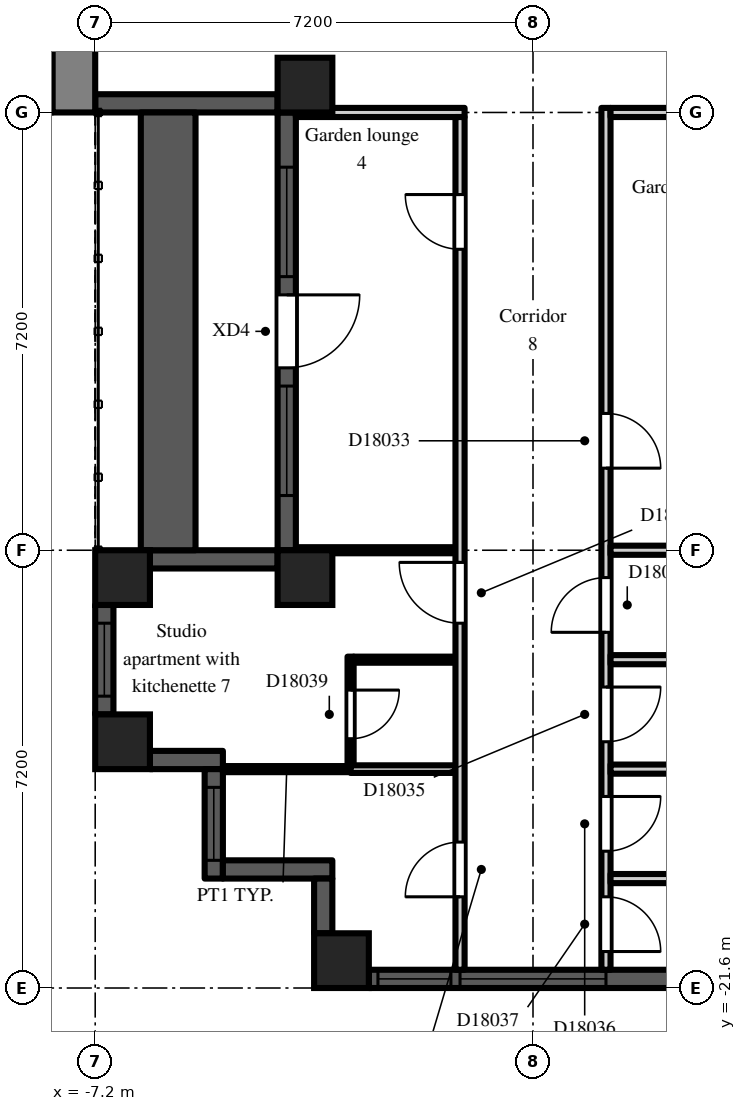
"""IFC4 building model, lengths in metres.
Left out: names, types, materials, properties, quantities, classifications, styles, units other than length and angle.
Written with IfcOpenShell. Run it as: python <this file> out.ifc"""

import sys

from ifc_helpers import new_model, si_unit, direction, frame, frame_2d, origin, origin_2d, place, context, subcontext, project, spatial, rectangle, extrude, element, fill, save


model = new_model("IFC4")
c1 = context("Model", 3, precision=1e-05, world=origin(), true_north=direction((0.0, 1.0)))
c2 = subcontext(c1, "Body", "Model", "MODEL_VIEW")
j1 = project(units=[si_unit("LENGTHUNIT", "METRE"), si_unit("PLANEANGLEUNIT", "RADIAN")], contexts=[c1])
p1 = place(None, origin())
s1 = spatial("IfcSite", under=j1, at=p1, CompositionType="ELEMENT")
p2 = place(p1, origin())
s2 = spatial("IfcBuilding", under=s1, at=p2, CompositionType="ELEMENT")
p3 = place(p2, frame((0.0, 0.0, 120.3)))
s3 = spatial("IfcBuildingStorey", under=s2, at=p3, CompositionType="ELEMENT", Elevation=120.3)
for number, where, z_axis, x_axis in (
    (1, (-6.75, -17.55, 0.0), (0.0, 0.0, 1.0), (1.0, 0.0, 0.0)),
    (2, (-6.75, -14.85, 0.0), (0.0, 0.0, 1.0), (1.0, 0.0, 0.0)),
    (3, (-3.75, -14.85, 0.0), (0.0, 0.0, 1.0), (1.0, 0.0, 0.0)),
    (4, (-3.75, -6.75, 0.0), (0.0, 0.0, 1.0), (1.0, 0.0, 0.0)),
    (5, (-3.15, -21.15, 0.0), (0.0, 0.0, 1.0), (1.0, 0.0, 0.0)),
):
    element("IfcColumn", number, at=place(p3, frame(where, z_axis=z_axis, x_axis=x_axis)), inside=s3, PredefinedType="COLUMN", context=c2, shape_type="SweptSolid", body=[
        extrude(rectangle(XDim=0.9, YDim=0.9, at=origin_2d()), origin(), (0.0, 0.0, 1.0), 3.0),
    ])
p4 = place(p3, frame((-7.2, -7.05, 0.0), z_axis=(0.0, 0.0, 1.0), x_axis=(1.0, 0.0, 0.0)))
e6 = element("IfcWall", 6, at=p4, inside=s3, PredefinedType="SOLIDWALL", context=c2, shape_type="SweptSolid", body=[
    extrude(rectangle(XDim=3.0, YDim=0.3, at=frame_2d((1.5, 0.0))), origin(), (0.0, 0.0, 1.0), 2.2),
])
p5 = place(p3, frame((-4.05, -7.2, 0.0), z_axis=(0.0, 0.0, 1.0), x_axis=(0.0, -1.0, 0.0)))
e7 = element("IfcWall", 7, at=p5, inside=s3, PredefinedType="SOLIDWALL", context=c2, shape_type="SweptSolid", body=[
    extrude(rectangle(XDim=7.2, YDim=0.3, at=frame_2d((3.6, 0.0))), origin(), (0.0, 0.0, 1.0), 2.2),
])
p6 = place(p5, frame((3.0, 0.0, 0.0)))
e8 = element("IfcOpeningElement", 8, at=p6, cuts=e7, PredefinedType="OPENING", context=c2, shape_type="SweptSolid", body=[
    extrude(rectangle(XDim=1.2, YDim=2.05, at=frame_2d((0.6, 1.025))), frame((0.0, 0.16, 0.0), z_axis=(0.0, -1.0, 0.0), x_axis=(1.0, 0.0, 0.0)), (0.0, 0.0, 1.0), 0.32),
])
p7 = place(p5, frame((0.9, 0.0, 0.2)))
e9 = element("IfcOpeningElement", 9, at=p7, cuts=e7, PredefinedType="OPENING", context=c2, shape_type="SweptSolid", body=[
    extrude(rectangle(XDim=1.8, YDim=1.85, at=frame_2d((0.9, 0.925))), frame((0.0, 0.16, 0.0), z_axis=(0.0, -1.0, 0.0), x_axis=(1.0, 0.0, 0.0)), (0.0, 0.0, 1.0), 0.32),
])
p8 = place(p5, frame((4.5, 0.0, 0.2)))
e10 = element("IfcOpeningElement", 10, at=p8, cuts=e7, PredefinedType="OPENING", context=c2, shape_type="SweptSolid", body=[
    extrude(rectangle(XDim=1.8, YDim=1.85, at=frame_2d((0.9, 0.925))), frame((0.0, 0.16, 0.0), z_axis=(0.0, -1.0, 0.0), x_axis=(1.0, 0.0, 0.0)), (0.0, 0.0, 1.0), 0.32),
])
p9 = place(p3, frame((-4.2, -14.55, 0.0), z_axis=(0.0, 0.0, 1.0), x_axis=(-1.0, 0.0, 0.0)))
e11 = element("IfcWall", 11, at=p9, inside=s3, PredefinedType="SOLIDWALL", context=c2, shape_type="SweptSolid", body=[
    extrude(rectangle(XDim=2.1, YDim=0.3, at=frame_2d((1.05, 0.0))), origin(), (0.0, 0.0, 1.0), 2.2),
])
p10 = place(p3, frame((-7.05, -15.3, 0.0), z_axis=(0.0, 0.0, 1.0), x_axis=(0.0, -1.0, 0.0)))
e12 = element("IfcWall", 12, at=p10, inside=s3, PredefinedType="SOLIDWALL", context=c2, shape_type="SweptSolid", body=[
    extrude(rectangle(XDim=1.8, YDim=0.3, at=frame_2d((0.9, 0.0))), origin(), (0.0, 0.0, 1.0), 2.2),
])
p11 = place(p10, frame((0.3, 0.0, 0.2)))
e13 = element("IfcOpeningElement", 13, at=p11, cuts=e12, PredefinedType="OPENING", context=c2, shape_type="SweptSolid", body=[
    extrude(rectangle(XDim=1.2, YDim=1.85, at=frame_2d((0.6, 0.925))), frame((0.0, 0.16, 0.0), z_axis=(0.0, -1.0, 0.0), x_axis=(1.0, 0.0, 0.0)), (0.0, 0.0, 1.0), 0.32),
])
p12 = place(p3, frame((-6.3, -17.85, 0.0), z_axis=(0.0, 0.0, 1.0), x_axis=(1.0, 0.0, 0.0)))
e14 = element("IfcWall", 14, at=p12, inside=s3, PredefinedType="SOLIDWALL", context=c2, shape_type="SweptSolid", body=[
    extrude(rectangle(XDim=1.2, YDim=0.3, at=frame_2d((0.6, 0.0))), origin(), (0.0, 0.0, 1.0), 2.6),
])
p13 = place(p3, frame((-5.25, -18.0, 0.0), z_axis=(0.0, 0.0, 1.0), x_axis=(0.0, -1.0, 0.0)))
e15 = element("IfcWall", 15, at=p13, inside=s3, PredefinedType="SOLIDWALL", context=c2, shape_type="SweptSolid", body=[
    extrude(rectangle(XDim=1.8, YDim=0.3, at=frame_2d((0.9, 0.0))), origin(), (0.0, 0.0, 1.0), 2.6),
])
p14 = place(p13, frame((0.3, 0.0, 0.2)))
e16 = element("IfcOpeningElement", 16, at=p14, cuts=e15, PredefinedType="OPENING", context=c2, shape_type="SweptSolid", body=[
    extrude(rectangle(XDim=1.2, YDim=1.85, at=frame_2d((0.6, 0.925))), frame((0.0, 0.16, 0.0), z_axis=(0.0, -1.0, 0.0), x_axis=(1.0, 0.0, 0.0)), (0.0, 0.0, 1.0), 0.32),
])
p15 = place(p3, frame((-5.1, -19.65, 0.0), z_axis=(0.0, 0.0, 1.0), x_axis=(1.0, 0.0, 0.0)))
e17 = element("IfcWall", 17, at=p15, inside=s3, PredefinedType="SOLIDWALL", context=c2, shape_type="SweptSolid", body=[
    extrude(rectangle(XDim=1.8, YDim=0.3, at=frame_2d((0.9, 0.0))), origin(), (0.0, 0.0, 1.0), 2.6),
])
p16 = place(p3, frame((-3.45, -19.8, 0.0), z_axis=(0.0, 0.0, 1.0), x_axis=(0.0, -1.0, 0.0)))
e18 = element("IfcWall", 18, at=p16, inside=s3, PredefinedType="SOLIDWALL", context=c2, shape_type="SweptSolid", body=[
    extrude(rectangle(XDim=0.9, YDim=0.3, at=frame_2d((0.45, 0.0))), origin(), (0.0, 0.0, 1.0), 2.6),
])
p17 = place(p3, frame((-2.7, -21.45, 0.0), z_axis=(0.0, 0.0, 1.0), x_axis=(1.0, 0.0, 0.0)))
e19 = element("IfcWall", 19, at=p17, inside=s3, PredefinedType="SOLIDWALL", context=c2, shape_type="SweptSolid", body=[
    extrude(rectangle(XDim=5.4, YDim=0.3, at=frame_2d((2.7, 0.0))), origin(), (0.0, 0.0, 1.0), 2.2),
])
p18 = place(p17, frame((1.5, 0.0, 0.2)))
e20 = element("IfcOpeningElement", 20, at=p18, cuts=e19, PredefinedType="OPENING", context=c2, shape_type="SweptSolid", body=[
    extrude(rectangle(XDim=2.4, YDim=1.85, at=frame_2d((1.2, 0.925))), frame((0.0, 0.16, 0.0), z_axis=(0.0, -1.0, 0.0), x_axis=(1.0, 0.0, 0.0)), (0.0, 0.0, 1.0), 0.32),
])
p19 = place(p17, frame((0.15, 0.0, 0.2)))
e21 = element("IfcOpeningElement", 21, at=p19, cuts=e19, PredefinedType="OPENING", context=c2, shape_type="SweptSolid", body=[
    extrude(rectangle(XDim=1.2, YDim=1.85, at=frame_2d((0.6, 0.925))), frame((0.0, 0.16, 0.0), z_axis=(0.0, -1.0, 0.0), x_axis=(1.0, 0.0, 0.0)), (0.0, 0.0, 1.0), 0.32),
])
p20 = place(p3, frame((-6.0, -14.4, 0.0), z_axis=(0.0, 0.0, 1.0), x_axis=(0.0, 1.0, 0.0)))
e22 = element("IfcWall", 22, at=p20, inside=s3, PredefinedType="PARAPET", context=c2, shape_type="SweptSolid", body=[
    extrude(rectangle(XDim=7.2, YDim=0.9, at=frame_2d((3.6, 0.0))), origin(), (0.0, 0.0, 1.0), 0.8),
])
p21 = place(p3, frame((-7.55, -7.2, 0.0), z_axis=(0.0, 0.0, 1.0), x_axis=(0.0, 1.0, 0.0)))
e23 = element("IfcWall", 23, at=p21, inside=s3, PredefinedType="SHEAR", context=c2, shape_type="SweptSolid", body=[
    extrude(rectangle(XDim=14.4, YDim=0.7, at=frame_2d((7.2, 0.0))), origin(), (0.0, 0.0, 1.0), 2.6),
])
p22 = place(p21, frame((6.0, 0.0, 0.0)))
e24 = element("IfcOpeningElement", 24, at=p22, cuts=e23, PredefinedType="OPENING", context=c2, shape_type="SweptSolid", body=[
    extrude(rectangle(XDim=2.4, YDim=2.2, at=frame_2d((1.2, 1.1))), frame((0.0, 0.36, 0.0), z_axis=(0.0, -1.0, 0.0), x_axis=(1.0, 0.0, 0.0)), (0.0, 0.0, 1.0), 0.72),
])
p23 = place(p3, frame((-5.1, -18.0, 0.0), z_axis=(0.0, 0.0, 1.0), x_axis=(1.0, 0.0, 0.0)))
e25 = element("IfcWall", 25, at=p23, inside=s3, PredefinedType="PARTITIONING", context=c2, shape_type="SweptSolid", body=[
    extrude(rectangle(XDim=2.1, YDim=0.1, at=frame_2d((1.05, 0.0))), origin(), (0.0, 0.0, 1.0), 2.6),
])
p24 = place(p3, frame((-3.9, -14.4, 0.0), z_axis=(0.0, 0.0, 1.0), x_axis=(1.0, 0.0, 0.0)))
e26 = element("IfcWall", 26, at=p24, inside=s3, PredefinedType="PARTITIONING", context=c2, shape_type="SweptSolid", body=[
    extrude(rectangle(XDim=2.625, YDim=0.1, at=frame_2d((1.312, 0.0))), origin(), (0.0, 0.0, 1.0), 2.6),
])
p25 = place(p3, frame((-3.9, -7.2, 0.0), z_axis=(0.0, 0.0, 1.0), x_axis=(1.0, 0.0, 0.0)))
e27 = element("IfcWall", 27, at=p25, inside=s3, PredefinedType="PARTITIONING", context=c2, shape_type="SweptSolid", body=[
    extrude(rectangle(XDim=2.775, YDim=0.15, at=frame_2d((1.387, 0.0))), origin(), (0.0, 0.0, 1.0), 2.6),
])
p26 = place(p3, frame((-3.0, -17.938, 0.0), z_axis=(0.0, 0.0, 1.0), x_axis=(0.0, 1.0, 0.0)))
e28 = element("IfcWall", 28, at=p26, inside=s3, PredefinedType="PARTITIONING", context=c2, shape_type="SweptSolid", body=[
    extrude(rectangle(XDim=1.788, YDim=0.1, at=frame_2d((0.894, 0.0))), origin(), (0.0, 0.0, 1.0), 2.6),
])
p27 = place(p26, frame((0.438, 0.0, 0.0)))
e29 = element("IfcOpeningElement", 29, at=p27, cuts=e28, PredefinedType="OPENING", context=c2, shape_type="SweptSolid", body=[
    extrude(rectangle(XDim=0.8, YDim=2.1, at=frame_2d((0.4, 1.05))), frame((0.0, 0.06, 0.0), z_axis=(0.0, -1.0, 0.0), x_axis=(1.0, 0.0, 0.0)), (0.0, 0.0, 1.0), 0.12),
])
p28 = place(p3, frame((-3.0, -18.0, 0.0), z_axis=(0.0, 0.0, 1.0), x_axis=(1.0, 0.0, 0.0)))
e30 = element("IfcWall", 30, at=p28, inside=s3, PredefinedType="PARTITIONING", context=c2, shape_type="SweptSolid", body=[
    extrude(rectangle(XDim=1.725, YDim=0.125, at=frame_2d((0.863, 0.0))), origin(), (0.0, 0.0, 1.0), 2.6),
])
p29 = place(p3, frame((-2.95, -16.2, 0.0), z_axis=(0.0, 0.0, 1.0), x_axis=(1.0, 0.0, 0.0)))
e31 = element("IfcWall", 31, at=p29, inside=s3, PredefinedType="PARTITIONING", context=c2, shape_type="SweptSolid", body=[
    extrude(rectangle(XDim=1.675, YDim=0.1, at=frame_2d((0.837, 0.0))), origin(), (0.0, 0.0, 1.0), 2.6),
])
p30 = place(p3, frame((-1.2, -21.3, 0.0), z_axis=(0.0, 0.0, 1.0), x_axis=(0.0, 1.0, 0.0)))
e32 = element("IfcWall", 32, at=p30, inside=s3, PredefinedType="PARTITIONING", context=c2, shape_type="SweptSolid", body=[
    extrude(rectangle(XDim=14.025, YDim=0.15, at=frame_2d((7.013, 0.0))), origin(), (0.0, 0.0, 1.0), 2.6),
])
p31 = place(p30, frame((11.85, 0.0, 0.0)))
e33 = element("IfcOpeningElement", 33, at=p31, cuts=e32, PredefinedType="OPENING", context=c2, shape_type="SweptSolid", body=[
    extrude(rectangle(XDim=0.9, YDim=2.1, at=frame_2d((0.45, 1.05))), frame((0.0, 0.085, 0.0), z_axis=(0.0, -1.0, 0.0), x_axis=(1.0, 0.0, 0.0)), (0.0, 0.0, 1.0), 0.17),
])
p32 = place(p30, frame((5.7, 0.0, 0.0)))
e34 = element("IfcOpeningElement", 34, at=p32, cuts=e32, PredefinedType="OPENING", context=c2, shape_type="SweptSolid", body=[
    extrude(rectangle(XDim=1.0, YDim=2.1, at=frame_2d((0.5, 1.05))), frame((0.0, 0.085, 0.0), z_axis=(0.0, -1.0, 0.0), x_axis=(1.0, 0.0, 0.0)), (0.0, 0.0, 1.0), 0.17),
])
p33 = place(p30, frame((1.2, 0.0, 0.0)))
e35 = element("IfcOpeningElement", 35, at=p33, cuts=e32, PredefinedType="OPENING", context=c2, shape_type="SweptSolid", body=[
    extrude(rectangle(XDim=0.9, YDim=2.1, at=frame_2d((0.45, 1.05))), frame((0.0, 0.085, 0.0), z_axis=(0.0, -1.0, 0.0), x_axis=(1.0, 0.0, 0.0)), (0.0, 0.0, 1.0), 0.17),
])
p34 = place(p3, frame((1.2, -21.3, 0.0), z_axis=(0.0, 0.0, 1.0), x_axis=(0.0, 1.0, 0.0)))
e36 = element("IfcWall", 36, at=p34, inside=s3, PredefinedType="PARTITIONING", context=c2, shape_type="SweptSolid", body=[
    extrude(rectangle(XDim=14.175, YDim=0.15, at=frame_2d((7.087, 0.0))), origin(), (0.0, 0.0, 1.0), 2.6),
])
p35 = place(p34, frame((8.25, 0.0, 0.0)))
e37 = element("IfcOpeningElement", 37, at=p35, cuts=e36, PredefinedType="OPENING", context=c2, shape_type="SweptSolid", body=[
    extrude(rectangle(XDim=0.9, YDim=2.1, at=frame_2d((0.45, 1.05))), frame((0.0, 0.085, 0.0), z_axis=(0.0, -1.0, 0.0), x_axis=(1.0, 0.0, 0.0)), (0.0, 0.0, 1.0), 0.17),
])
p36 = place(p34, frame((5.55, 0.0, 0.0)))
e38 = element("IfcOpeningElement", 38, at=p36, cuts=e36, PredefinedType="OPENING", context=c2, shape_type="SweptSolid", body=[
    extrude(rectangle(XDim=0.9, YDim=2.1, at=frame_2d((0.45, 1.05))), frame((0.0, 0.085, 0.0), z_axis=(0.0, -1.0, 0.0), x_axis=(1.0, 0.0, 0.0)), (0.0, 0.0, 1.0), 0.17),
])
p37 = place(p34, frame((3.75, 0.0, 0.0)))
e39 = element("IfcOpeningElement", 39, at=p37, cuts=e36, PredefinedType="OPENING", context=c2, shape_type="SweptSolid", body=[
    extrude(rectangle(XDim=0.9, YDim=2.1, at=frame_2d((0.45, 1.05))), frame((0.0, 0.085, 0.0), z_axis=(0.0, -1.0, 0.0), x_axis=(1.0, 0.0, 0.0)), (0.0, 0.0, 1.0), 0.17),
])
p38 = place(p34, frame((1.95, 0.0, 0.0)))
e40 = element("IfcOpeningElement", 40, at=p38, cuts=e36, PredefinedType="OPENING", context=c2, shape_type="SweptSolid", body=[
    extrude(rectangle(XDim=0.9, YDim=2.1, at=frame_2d((0.45, 1.05))), frame((0.0, 0.085, 0.0), z_axis=(0.0, -1.0, 0.0), x_axis=(1.0, 0.0, 0.0)), (0.0, 0.0, 1.0), 0.17),
])
p39 = place(p34, frame((0.3, 0.0, 0.0)))
e41 = element("IfcOpeningElement", 41, at=p39, cuts=e36, PredefinedType="OPENING", context=c2, shape_type="SweptSolid", body=[
    extrude(rectangle(XDim=0.9, YDim=2.1, at=frame_2d((0.45, 1.05))), frame((0.0, 0.085, 0.0), z_axis=(0.0, -1.0, 0.0), x_axis=(1.0, 0.0, 0.0)), (0.0, 0.0, 1.0), 0.17),
])
p40 = place(p3, frame((1.275, -19.8, 0.0), z_axis=(0.0, 0.0, 1.0), x_axis=(1.0, 0.0, 0.0)))
e42 = element("IfcWall", 42, at=p40, inside=s3, PredefinedType="PARTITIONING", context=c2, shape_type="SweptSolid", body=[
    extrude(rectangle(XDim=2.025, YDim=0.15, at=frame_2d((1.013, 0.0))), origin(), (0.0, 0.0, 1.0), 2.6),
])
p41 = place(p3, frame((1.275, -18.0, 0.0), z_axis=(0.0, 0.0, 1.0), x_axis=(1.0, 0.0, 0.0)))
e43 = element("IfcWall", 43, at=p41, inside=s3, PredefinedType="PARTITIONING", context=c2, shape_type="SweptSolid", body=[
    extrude(rectangle(XDim=3.825, YDim=0.15, at=frame_2d((1.913, 0.0))), origin(), (0.0, 0.0, 1.0), 2.6),
])
p42 = place(p3, frame((1.275, -16.2, 0.0), z_axis=(0.0, 0.0, 1.0), x_axis=(1.0, 0.0, 0.0)))
e44 = element("IfcWall", 44, at=p42, inside=s3, PredefinedType="PARTITIONING", context=c2, shape_type="SweptSolid", body=[
    extrude(rectangle(XDim=5.625, YDim=0.15, at=frame_2d((2.812, 0.0))), origin(), (0.0, 0.0, 1.0), 2.6),
])
for number, where, z_axis, x_axis in (
    (45, (1.275, -14.4, 0.0), (0.0, 0.0, 1.0), (1.0, 0.0, 0.0)),
    (46, (1.275, -7.2, 0.0), (0.0, 0.0, 1.0), (1.0, 0.0, 0.0)),
):
    element("IfcWall", number, at=place(p3, frame(where, z_axis=z_axis, x_axis=x_axis)), inside=s3, PredefinedType="PARTITIONING", context=c2, shape_type="SweptSolid", body=[
        extrude(rectangle(XDim=2.625, YDim=0.15, at=frame_2d((1.312, 0.0))), origin(), (0.0, 0.0, 1.0), 2.6),
    ])
p43 = place(p6, origin())
e47 = element("IfcDoor", 47, at=p43, inside=s3, OperationType="SINGLE_SWING_LEFT", PredefinedType="DOOR", context=c2, shape_type="SweptSolid", body=[
    extrude(rectangle(XDim=1.2, YDim=2.05, at=frame_2d((0.6, 1.025))), frame((0.0, 0.025, 0.0), z_axis=(0.0, -1.0, 0.0), x_axis=(1.0, 0.0, 0.0)), (0.0, 0.0, 1.0), 0.05),
])
fill(e8, e47)
p44 = place(p7, origin())
e48 = element("IfcWindow", 48, at=p44, inside=s3, PartitioningType="SINGLE_PANEL", PredefinedType="WINDOW", context=c2, shape_type="SweptSolid", body=[
    extrude(rectangle(XDim=1.8, YDim=1.85, at=frame_2d((0.9, 0.925))), frame((0.0, 0.03, 0.0), z_axis=(0.0, -1.0, 0.0), x_axis=(1.0, 0.0, 0.0)), (0.0, 0.0, 1.0), 0.06),
])
fill(e9, e48)
p45 = place(p8, origin())
e49 = element("IfcWindow", 49, at=p45, inside=s3, PartitioningType="SINGLE_PANEL", PredefinedType="WINDOW", context=c2, shape_type="SweptSolid", body=[
    extrude(rectangle(XDim=1.8, YDim=1.85, at=frame_2d((0.9, 0.925))), frame((0.0, 0.03, 0.0), z_axis=(0.0, -1.0, 0.0), x_axis=(1.0, 0.0, 0.0)), (0.0, 0.0, 1.0), 0.06),
])
fill(e10, e49)
p46 = place(p11, origin())
e50 = element("IfcWindow", 50, at=p46, inside=s3, PartitioningType="SINGLE_PANEL", PredefinedType="WINDOW", context=c2, shape_type="SweptSolid", body=[
    extrude(rectangle(XDim=1.2, YDim=1.85, at=frame_2d((0.6, 0.925))), frame((0.0, 0.03, 0.0), z_axis=(0.0, -1.0, 0.0), x_axis=(1.0, 0.0, 0.0)), (0.0, 0.0, 1.0), 0.06),
])
fill(e13, e50)
p47 = place(p14, origin())
e51 = element("IfcWindow", 51, at=p47, inside=s3, PartitioningType="SINGLE_PANEL", PredefinedType="WINDOW", context=c2, shape_type="SweptSolid", body=[
    extrude(rectangle(XDim=1.2, YDim=1.85, at=frame_2d((0.6, 0.925))), frame((0.0, 0.03, 0.0), z_axis=(0.0, -1.0, 0.0), x_axis=(1.0, 0.0, 0.0)), (0.0, 0.0, 1.0), 0.06),
])
fill(e16, e51)
p48 = place(p18, origin())
e52 = element("IfcWindow", 52, at=p48, inside=s3, PartitioningType="SINGLE_PANEL", PredefinedType="WINDOW", context=c2, shape_type="SweptSolid", body=[
    extrude(rectangle(XDim=2.4, YDim=1.85, at=frame_2d((1.2, 0.925))), frame((0.0, 0.03, 0.0), z_axis=(0.0, -1.0, 0.0), x_axis=(1.0, 0.0, 0.0)), (0.0, 0.0, 1.0), 0.06),
])
fill(e20, e52)
p49 = place(p19, origin())
e53 = element("IfcWindow", 53, at=p49, inside=s3, PartitioningType="SINGLE_PANEL", PredefinedType="WINDOW", context=c2, shape_type="SweptSolid", body=[
    extrude(rectangle(XDim=1.2, YDim=1.85, at=frame_2d((0.6, 0.925))), frame((0.0, 0.03, 0.0), z_axis=(0.0, -1.0, 0.0), x_axis=(1.0, 0.0, 0.0)), (0.0, 0.0, 1.0), 0.06),
])
fill(e21, e53)
p50 = place(p35, frame((0.9, 0.0, 0.0), z_axis=(0.0, 0.0, 1.0), x_axis=(-1.0, 0.0, 0.0)))
e54 = element("IfcDoor", 54, at=p50, inside=s3, OperationType="SINGLE_SWING_RIGHT", PredefinedType="DOOR", context=c2, shape_type="SweptSolid", body=[
    extrude(rectangle(XDim=0.9, YDim=2.1, at=frame_2d((0.45, 1.05))), frame((0.0, 0.025, 0.0), z_axis=(0.0, -1.0, 0.0), x_axis=(1.0, 0.0, 0.0)), (0.0, 0.0, 1.0), 0.05),
])
fill(e37, e54)
p51 = place(p36, origin())
e55 = element("IfcDoor", 55, at=p51, inside=s3, OperationType="SINGLE_SWING_LEFT", PredefinedType="DOOR", context=c2, shape_type="SweptSolid", body=[
    extrude(rectangle(XDim=0.9, YDim=2.1, at=frame_2d((0.45, 1.05))), frame((0.0, 0.025, 0.0), z_axis=(0.0, -1.0, 0.0), x_axis=(1.0, 0.0, 0.0)), (0.0, 0.0, 1.0), 0.05),
])
fill(e38, e55)
p52 = place(p37, frame((0.9, 0.0, 0.0), z_axis=(0.0, 0.0, 1.0), x_axis=(-1.0, 0.0, 0.0)))
e56 = element("IfcDoor", 56, at=p52, inside=s3, OperationType="SINGLE_SWING_LEFT", PredefinedType="DOOR", context=c2, shape_type="SweptSolid", body=[
    extrude(rectangle(XDim=0.9, YDim=2.1, at=frame_2d((0.45, 1.05))), frame((0.0, 0.025, 0.0), z_axis=(0.0, -1.0, 0.0), x_axis=(1.0, 0.0, 0.0)), (0.0, 0.0, 1.0), 0.05),
])
fill(e39, e56)
p53 = place(p38, frame((0.9, 0.0, 0.0), z_axis=(0.0, 0.0, 1.0), x_axis=(-1.0, 0.0, 0.0)))
e57 = element("IfcDoor", 57, at=p53, inside=s3, OperationType="SINGLE_SWING_LEFT", PredefinedType="DOOR", context=c2, shape_type="SweptSolid", body=[
    extrude(rectangle(XDim=0.9, YDim=2.1, at=frame_2d((0.45, 1.05))), frame((0.0, 0.025, 0.0), z_axis=(0.0, -1.0, 0.0), x_axis=(1.0, 0.0, 0.0)), (0.0, 0.0, 1.0), 0.05),
])
fill(e40, e57)
p54 = place(p39, frame((0.9, 0.0, 0.0), z_axis=(0.0, 0.0, 1.0), x_axis=(-1.0, 0.0, 0.0)))
e58 = element("IfcDoor", 58, at=p54, inside=s3, OperationType="SINGLE_SWING_RIGHT", PredefinedType="DOOR", context=c2, shape_type="SweptSolid", body=[
    extrude(rectangle(XDim=0.9, YDim=2.1, at=frame_2d((0.45, 1.05))), frame((0.0, 0.025, 0.0), z_axis=(0.0, -1.0, 0.0), x_axis=(1.0, 0.0, 0.0)), (0.0, 0.0, 1.0), 0.05),
])
fill(e41, e58)
p55 = place(p31, origin())
e59 = element("IfcDoor", 59, at=p55, inside=s3, OperationType="SINGLE_SWING_RIGHT", PredefinedType="DOOR", context=c2, shape_type="SweptSolid", body=[
    extrude(rectangle(XDim=0.9, YDim=2.1, at=frame_2d((0.45, 1.05))), frame((0.0, 0.025, 0.0), z_axis=(0.0, -1.0, 0.0), x_axis=(1.0, 0.0, 0.0)), (0.0, 0.0, 1.0), 0.05),
])
fill(e33, e59)
p56 = place(p27, frame((0.8, 0.0, 0.0), z_axis=(0.0, 0.0, 1.0), x_axis=(-1.0, 0.0, 0.0)))
e60 = element("IfcDoor", 60, at=p56, inside=s3, OperationType="SINGLE_SWING_LEFT", PredefinedType="DOOR", context=c2, shape_type="SweptSolid", body=[
    extrude(rectangle(XDim=0.8, YDim=2.1, at=frame_2d((0.4, 1.05))), frame((0.0, 0.025, 0.0), z_axis=(0.0, -1.0, 0.0), x_axis=(1.0, 0.0, 0.0)), (0.0, 0.0, 1.0), 0.05),
])
fill(e29, e60)
p57 = place(p32, origin())
e61 = element("IfcDoor", 61, at=p57, inside=s3, OperationType="SINGLE_SWING_RIGHT", PredefinedType="DOOR", context=c2, shape_type="SweptSolid", body=[
    extrude(rectangle(XDim=1.0, YDim=2.1, at=frame_2d((0.5, 1.05))), frame((0.0, 0.025, 0.0), z_axis=(0.0, -1.0, 0.0), x_axis=(1.0, 0.0, 0.0)), (0.0, 0.0, 1.0), 0.05),
])
fill(e34, e61)
p58 = place(p33, origin())
e62 = element("IfcDoor", 62, at=p58, inside=s3, OperationType="SINGLE_SWING_LEFT", PredefinedType="DOOR", context=c2, shape_type="SweptSolid", body=[
    extrude(rectangle(XDim=0.9, YDim=2.1, at=frame_2d((0.45, 1.05))), frame((0.0, 0.025, 0.0), z_axis=(0.0, -1.0, 0.0), x_axis=(1.0, 0.0, 0.0)), (0.0, 0.0, 1.0), 0.05),
])
fill(e35, e62)
save(model, sys.argv[1])
